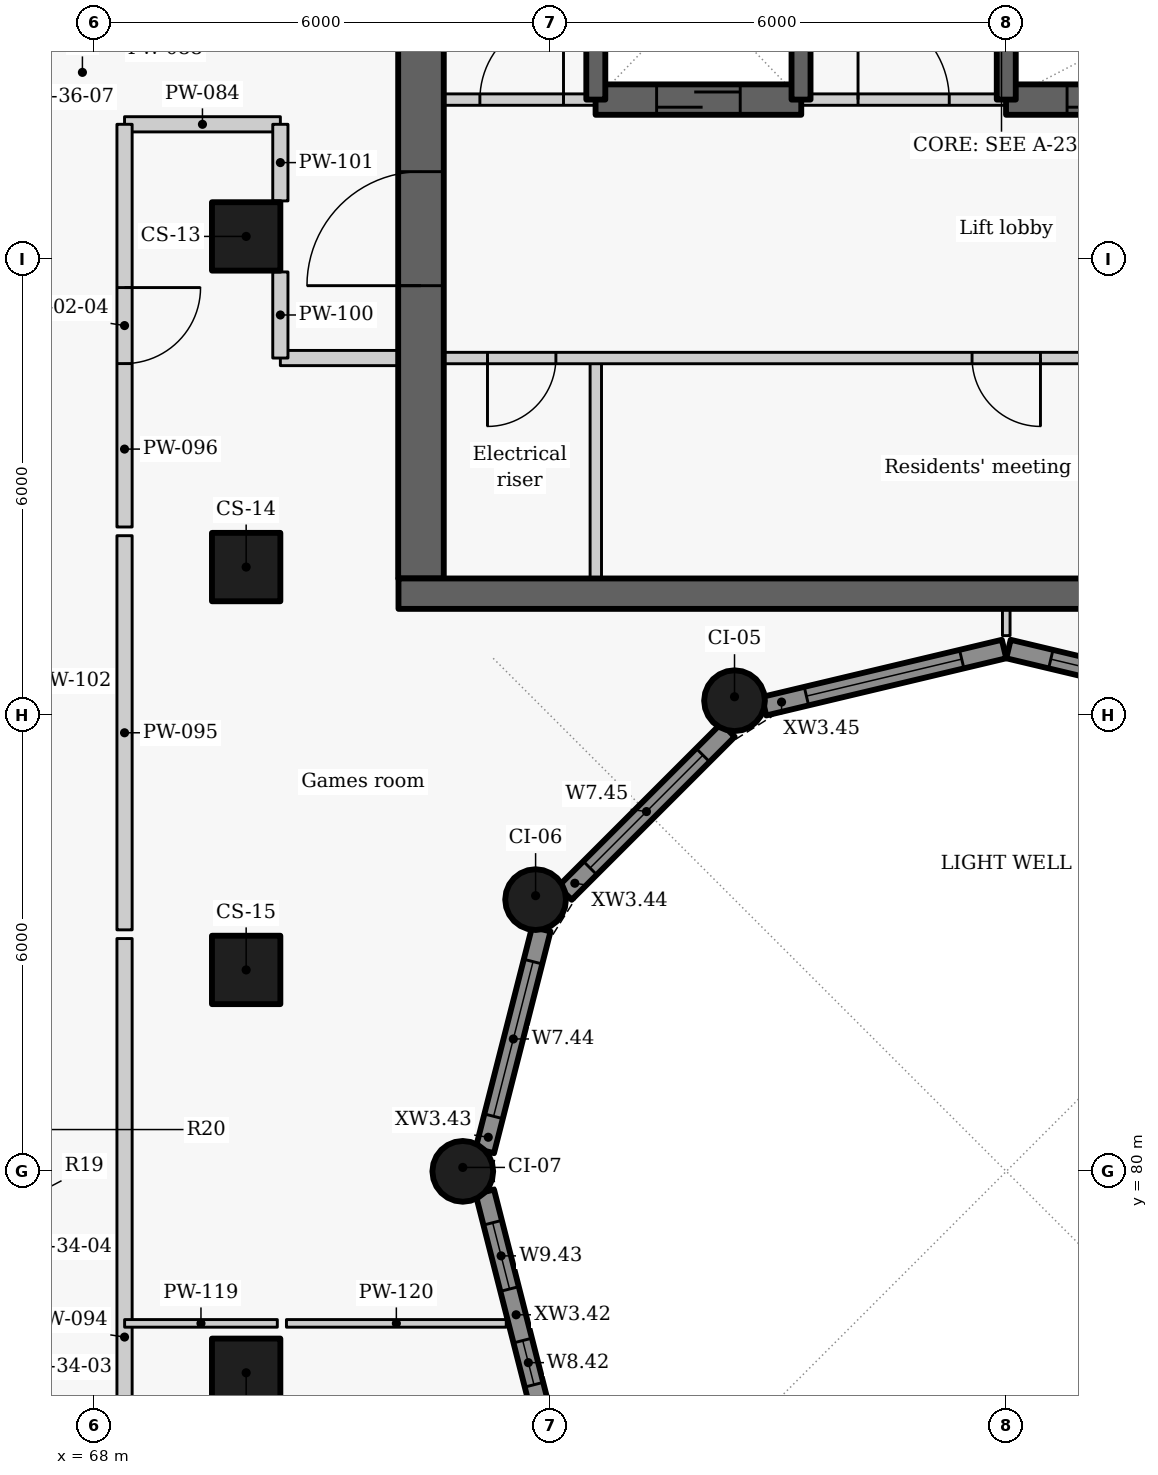
"""IFC4 building model, lengths in metres.
Left out: names, types, materials, properties, quantities, classifications, styles, units other than length and angle.
Written with IfcOpenShell. Run it as: python <this file> out.ifc"""

import sys

from ifc_helpers import new_model, si_unit, direction, frame, frame_2d, origin, origin_2d, place, context, subcontext, project, spatial, rectangle, circle, extrude, element, fill, save


model = new_model("IFC4")
c1 = context("Model", 3, precision=1e-05, world=origin(), true_north=direction((0.0, 1.0)))
c2 = subcontext(c1, "Body", "Model", "MODEL_VIEW")
j1 = project(units=[si_unit("LENGTHUNIT", "METRE"), si_unit("PLANEANGLEUNIT", "RADIAN")], contexts=[c1])
p1 = place(None, origin())
s1 = spatial("IfcSite", under=j1, at=p1, CompositionType="ELEMENT")
p2 = place(p1, origin())
s2 = spatial("IfcBuilding", under=s1, at=p2, CompositionType="ELEMENT")
p3 = place(p2, frame((0.0, 0.0, 216.3)))
s3 = spatial("IfcBuildingStorey", under=s2, at=p3, CompositionType="ELEMENT", Elevation=216.3)
for number, where, z_axis, x_axis in (
    (1, (70.0, 92.3, 0.0), (0.0, 0.0, 1.0), (0.0, -1.0, 0.0)),
    (2, (70.0, 87.95, 0.0), (0.0, 0.0, 1.0), (0.0, -1.0, 0.0)),
    (3, (70.0, 82.65, 0.0), (0.0, 0.0, 1.0), (0.0, -1.0, 0.0)),
    (4, (70.0, 77.35, 0.0), (0.0, 0.0, 1.0), (0.0, -1.0, 0.0)),
):
    element("IfcColumn", number, at=place(p3, frame(where, z_axis=z_axis, x_axis=x_axis)), inside=s3, PredefinedType="COLUMN", context=c2, shape_type="SweptSolid", body=[
        extrude(rectangle(XDim=0.9, YDim=0.9, at=origin_2d()), origin(), (0.0, 0.0, 1.0), 3.3),
    ])
for number, where, z_axis, x_axis in (
    (5, (76.425, 86.192, 0.0), (0.0, 0.0, 1.0), (-0.866, -0.5, 0.0)),
    (6, (73.808, 83.575, 0.0), (0.0, 0.0, 1.0), (-0.5, -0.866, 0.0)),
    (7, (72.85, 80.0, 0.0), (0.0, 0.0, 1.0), (0.0, -1.0, 0.0)),
):
    element("IfcColumn", number, at=place(p3, frame(where, z_axis=z_axis, x_axis=x_axis)), inside=s3, PredefinedType="COLUMN", context=c2, shape_type="SweptSolid", body=[
        extrude(circle(Radius=0.4, at=origin_2d()), origin(), (0.0, 0.0, 1.0), 3.3),
    ])
p4 = place(p3, frame((73.883, 76.813, 0.0), z_axis=(0.0, 0.0, 1.0), x_axis=(-0.247055971283, 0.969001211069, 0.0)))
e8 = element("IfcWall", 8, at=p4, inside=s3, PredefinedType="SOLIDWALL", context=c2, shape_type="SweptSolid", body=[
    extrude(rectangle(XDim=3.01, YDim=0.25, at=frame_2d((1.505, 0.0))), origin(), (0.0, 0.0, 1.0), 2.05),
])
p5 = place(p4, frame((0.392, 0.0, 0.9)))
e9 = element("IfcOpeningElement", 9, at=p5, cuts=e8, PredefinedType="OPENING", context=c2, shape_type="SweptSolid", body=[
    extrude(rectangle(XDim=0.6, YDim=1.1, at=frame_2d((0.3, 0.55))), frame((0.0, 0.135, 0.0), z_axis=(0.0, -1.0, 0.0), x_axis=(1.0, 0.0, 0.0)), (0.0, 0.0, 1.0), 0.27),
])
p6 = place(p4, frame((1.691, 0.0, 0.9)))
e10 = element("IfcOpeningElement", 10, at=p6, cuts=e8, PredefinedType="OPENING", context=c2, shape_type="SweptSolid", body=[
    extrude(rectangle(XDim=0.9, YDim=1.1, at=frame_2d((0.45, 0.55))), frame((0.0, 0.135, 0.0), z_axis=(0.0, -1.0, 0.0), x_axis=(1.0, 0.0, 0.0)), (0.0, 0.0, 1.0), 0.27),
])
p7 = place(p3, frame((73.14, 80.27, 0.0), z_axis=(0.0, 0.0, 1.0), x_axis=(0.247055971283, 0.969001211069, 0.0)))
e11 = element("IfcWall", 11, at=p7, inside=s3, PredefinedType="SOLIDWALL", context=c2, shape_type="SweptSolid", body=[
    extrude(rectangle(XDim=3.01, YDim=0.25, at=frame_2d((1.505, 0.0))), origin(), (0.0, 0.0, 1.0), 2.05),
])
p8 = place(p7, frame((0.469, 0.0, 0.9)))
e12 = element("IfcOpeningElement", 12, at=p8, cuts=e11, PredefinedType="OPENING", context=c2, shape_type="SweptSolid", body=[
    extrude(rectangle(XDim=2.1, YDim=1.1, at=frame_2d((1.05, 0.55))), frame((0.0, 0.135, 0.0), z_axis=(0.0, -1.0, 0.0), x_axis=(1.0, 0.0, 0.0)), (0.0, 0.0, 1.0), 0.27),
])
p9 = place(p3, frame((74.194, 83.661, 0.0), z_axis=(0.0, 0.0, 1.0), x_axis=(0.707106781187, 0.707106781187, 0.0)))
e13 = element("IfcWall", 13, at=p9, inside=s3, PredefinedType="SOLIDWALL", context=c2, shape_type="SweptSolid", body=[
    extrude(rectangle(XDim=3.033, YDim=0.25, at=frame_2d((1.517, 0.0))), origin(), (0.0, 0.0, 1.0), 2.05),
])
p10 = place(p9, frame((0.467, 0.0, 0.9)))
e14 = element("IfcOpeningElement", 14, at=p10, cuts=e13, PredefinedType="OPENING", context=c2, shape_type="SweptSolid", body=[
    extrude(rectangle(XDim=2.1, YDim=1.1, at=frame_2d((1.05, 0.55))), frame((0.0, 0.135, 0.0), z_axis=(0.0, -1.0, 0.0), x_axis=(1.0, 0.0, 0.0)), (0.0, 0.0, 1.0), 0.27),
])
p11 = place(p3, frame((76.814, 86.119, 0.0), z_axis=(0.0, 0.0, 1.0), x_axis=(0.972773113459, 0.231759508395, 0.0)))
e15 = element("IfcWall", 15, at=p11, inside=s3, PredefinedType="SOLIDWALL", context=c2, shape_type="SweptSolid", body=[
    extrude(rectangle(XDim=3.246, YDim=0.25, at=frame_2d((1.623, 0.0))), origin(), (0.0, 0.0, 1.0), 2.05),
])
p12 = place(p11, frame((0.573, 0.0, 0.9)))
e16 = element("IfcOpeningElement", 16, at=p12, cuts=e15, PredefinedType="OPENING", context=c2, shape_type="SweptSolid", body=[
    extrude(rectangle(XDim=2.1, YDim=1.1, at=frame_2d((1.05, 0.55))), frame((0.0, 0.135, 0.0), z_axis=(0.0, -1.0, 0.0), x_axis=(1.0, 0.0, 0.0)), (0.0, 0.0, 1.0), 0.27),
])
p13 = place(p3, frame((80.029, 86.872, 0.0), z_axis=(0.0, 0.0, 1.0), x_axis=(0.972773113459, -0.231759508395, 0.0)))
e17 = element("IfcWall", 17, at=p13, inside=s3, PredefinedType="SOLIDWALL", context=c2, shape_type="SweptSolid", body=[
    extrude(rectangle(XDim=3.246, YDim=0.25, at=frame_2d((1.623, 0.0))), origin(), (0.0, 0.0, 1.0), 2.05),
])
p14 = place(p13, frame((0.573, 0.0, 0.9)))
e18 = element("IfcOpeningElement", 18, at=p14, cuts=e17, PredefinedType="OPENING", context=c2, shape_type="SweptSolid", body=[
    extrude(rectangle(XDim=2.1, YDim=1.1, at=frame_2d((1.05, 0.55))), frame((0.0, 0.135, 0.0), z_axis=(0.0, -1.0, 0.0), x_axis=(1.0, 0.0, 0.0)), (0.0, 0.0, 1.0), 0.27),
])
p15 = place(p3, frame((74.6, 87.8, 0.0), z_axis=(0.0, 0.0, 1.0), x_axis=(0.0, 1.0, 0.0)))
e19 = element("IfcWall", 19, at=p15, inside=s3, PredefinedType="PARTITIONING", context=c2, shape_type="SweptSolid", body=[
    extrude(rectangle(XDim=2.9, YDim=0.15, at=frame_2d((1.45, 0.0))), origin(), (0.0, 0.0, 1.0), 2.95),
])
p16 = place(p3, frame((85.4, 90.7, 0.0), z_axis=(0.0, 0.0, 1.0), x_axis=(-1.0, 0.0, 0.0)))
e20 = element("IfcWall", 20, at=p16, inside=s3, PredefinedType="PARTITIONING", context=c2, shape_type="SweptSolid", body=[
    extrude(rectangle(XDim=13.4, YDim=0.15, at=frame_2d((6.7, 0.0))), origin(), (0.0, 0.0, 1.0), 2.95),
])
p17 = place(p16, frame((11.325, 0.0, 0.0)))
e21 = element("IfcOpeningElement", 21, at=p17, cuts=e20, PredefinedType="OPENING", context=c2, shape_type="SweptSolid", body=[
    extrude(rectangle(XDim=0.9, YDim=2.1, at=frame_2d((0.45, 1.05))), frame((0.0, 0.085, 0.0), z_axis=(0.0, -1.0, 0.0), x_axis=(1.0, 0.0, 0.0)), (0.0, 0.0, 1.0), 0.17),
])
p18 = place(p16, frame((4.95, 0.0, 0.0)))
e22 = element("IfcOpeningElement", 22, at=p18, cuts=e20, PredefinedType="OPENING", context=c2, shape_type="SweptSolid", body=[
    extrude(rectangle(XDim=0.9, YDim=2.1, at=frame_2d((0.45, 1.05))), frame((0.0, 0.085, 0.0), z_axis=(0.0, -1.0, 0.0), x_axis=(1.0, 0.0, 0.0)), (0.0, 0.0, 1.0), 0.17),
])
p19 = place(p3, frame((72.3, 87.8, -0.275), z_axis=(0.0, 0.0, 1.0), x_axis=(0.0, 1.0, 0.0)))
e23 = element("IfcWall", 23, at=p19, inside=s3, PredefinedType="SHEAR", context=c2, shape_type="SweptSolid", body=[
    extrude(rectangle(XDim=9.1, YDim=0.6, at=frame_2d((4.55, 0.0))), origin(), (0.0, 0.0, 1.0), 3.225),
])
p20 = place(p19, frame((3.852, 0.0, 0.275)))
e24 = element("IfcOpeningElement", 24, at=p20, cuts=e23, PredefinedType="OPENING", context=c2, shape_type="SweptSolid", body=[
    extrude(rectangle(XDim=1.5, YDim=2.1, at=frame_2d((0.75, 1.05))), frame((0.0, 0.31, 0.0), z_axis=(0.0, -1.0, 0.0), x_axis=(1.0, 0.0, 0.0)), (0.0, 0.0, 1.0), 0.62),
])
p21 = place(p3, frame((72.0, 94.1, 0.0), z_axis=(0.0, 0.0, 1.0), x_axis=(1.0, 0.0, 0.0)))
e25 = element("IfcWall", 25, at=p21, inside=s3, PredefinedType="PARTITIONING", context=c2, shape_type="SweptSolid", body=[
    extrude(rectangle(XDim=2.603, YDim=0.15, at=frame_2d((1.302, 0.0))), origin(), (0.0, 0.0, 1.0), 2.95),
])
p22 = place(p21, frame((1.075, 0.0, 0.0)))
e26 = element("IfcOpeningElement", 26, at=p22, cuts=e25, PredefinedType="OPENING", context=c2, shape_type="SweptSolid", body=[
    extrude(rectangle(XDim=1.1, YDim=2.1, at=frame_2d((0.55, 1.05))), frame((0.0, 0.085, 0.0), z_axis=(0.0, -1.0, 0.0), x_axis=(1.0, 0.0, 0.0)), (0.0, 0.0, 1.0), 0.17),
])
p23 = place(p3, frame((77.297, 94.1, 0.0), z_axis=(0.0, 0.0, 1.0), x_axis=(1.0, 0.0, 0.0)))
e27 = element("IfcWall", 27, at=p23, inside=s3, PredefinedType="PARTITIONING", context=c2, shape_type="SweptSolid", body=[
    extrude(rectangle(XDim=2.706, YDim=0.15, at=frame_2d((1.353, 0.0))), origin(), (0.0, 0.0, 1.0), 2.95),
])
p24 = place(p23, frame((0.753, 0.0, 0.0)))
e28 = element("IfcOpeningElement", 28, at=p24, cuts=e27, PredefinedType="OPENING", context=c2, shape_type="SweptSolid", body=[
    extrude(rectangle(XDim=1.2, YDim=2.1, at=frame_2d((0.6, 1.05))), frame((0.0, 0.085, 0.0), z_axis=(0.0, -1.0, 0.0), x_axis=(1.0, 0.0, 0.0)), (0.0, 0.0, 1.0), 0.17),
])
p25 = place(p3, frame((74.597, 94.1, -0.275), z_axis=(0.0, 0.0, 1.0), x_axis=(1.0, 0.0, 0.0)))
e29 = element("IfcWall", 29, at=p25, inside=s3, PredefinedType="SHEAR", context=c2, shape_type="SweptSolid", body=[
    extrude(rectangle(XDim=2.706, YDim=0.4, at=frame_2d((1.353, 0.0))), origin(), (0.0, 0.0, 1.0), 3.225),
])
p26 = place(p25, frame((0.803, 0.0, 0.275)))
e30 = element("IfcOpeningElement", 30, at=p26, cuts=e29, PredefinedType="OPENING", context=c2, shape_type="SweptSolid", body=[
    extrude(rectangle(XDim=1.1, YDim=2.1, at=frame_2d((0.55, 1.05))), frame((0.0, 0.21, 0.0), z_axis=(0.0, -1.0, 0.0), x_axis=(1.0, 0.0, 0.0)), (0.0, 0.0, 1.0), 0.42),
])
p27 = place(p3, frame((79.997, 94.1, -0.275), z_axis=(0.0, 0.0, 1.0), x_axis=(1.0, 0.0, 0.0)))
e31 = element("IfcWall", 31, at=p27, inside=s3, PredefinedType="SHEAR", context=c2, shape_type="SweptSolid", body=[
    extrude(rectangle(XDim=5.406, YDim=0.4, at=frame_2d((2.703, 0.0))), origin(), (0.0, 0.0, 1.0), 3.225),
])
p28 = place(p27, frame((0.803, 0.0, 0.275)))
e32 = element("IfcOpeningElement", 32, at=p28, cuts=e31, PredefinedType="OPENING", context=c2, shape_type="SweptSolid", body=[
    extrude(rectangle(XDim=1.1, YDim=2.1, at=frame_2d((0.55, 1.05))), frame((0.0, 0.21, 0.0), z_axis=(0.0, -1.0, 0.0), x_axis=(1.0, 0.0, 0.0)), (0.0, 0.0, 1.0), 0.42),
])
for number, where, z_axis, x_axis in (
    (33, (74.6, 94.1, -0.275), (0.0, 0.0, 1.0), (0.0, 1.0, 0.0)),
    (34, (77.3, 94.1, -0.275), (0.0, 0.0, 1.0), (0.0, 1.0, 0.0)),
    (35, (80.0, 94.1, -0.275), (0.0, 0.0, 1.0), (0.0, 1.0, 0.0)),
):
    element("IfcWall", number, at=place(p3, frame(where, z_axis=z_axis, x_axis=x_axis)), inside=s3, PredefinedType="SHEAR", context=c2, shape_type="SweptSolid", body=[
        extrude(rectangle(XDim=2.8, YDim=0.25, at=frame_2d((1.4, 0.0))), origin(), (0.0, 0.0, 1.0), 3.225),
    ])
p29 = place(p3, frame((68.4, 93.775, 0.0), z_axis=(0.0, 0.0, 1.0), x_axis=(1.0, 0.0, 0.0)))
e36 = element("IfcWall", 36, at=p29, inside=s3, PredefinedType="PARTITIONING", context=c2, shape_type="SweptSolid", body=[
    extrude(rectangle(XDim=2.05, YDim=0.2, at=frame_2d((1.025, 0.0))), origin(), (0.0, 0.0, 1.0), 2.43),
])
p30 = place(p3, frame((70.45, 90.7, 0.0), z_axis=(0.0, 0.0, 1.0), x_axis=(1.0, 0.0, 0.0)))
e37 = element("IfcWall", 37, at=p30, inside=s3, PredefinedType="PARTITIONING", context=c2, shape_type="SweptSolid", body=[
    extrude(rectangle(XDim=1.55, YDim=0.2, at=frame_2d((0.775, 0.0))), origin(), (0.0, 0.0, 1.0), 2.95),
])
p31 = place(p3, frame((68.4, 72.577, 0.0), z_axis=(0.0, 0.0, 1.0), x_axis=(0.0, 1.0, 0.0)))
e38 = element("IfcWall", 38, at=p31, inside=s3, PredefinedType="PARTITIONING", context=c2, shape_type="SweptSolid", body=[
    extrude(rectangle(XDim=10.486, YDim=0.2, at=frame_2d((5.243, 0.0))), origin(), (0.0, 0.0, 1.0), 2.95),
])
p32 = place(p3, frame((68.4, 83.177, 0.0), z_axis=(0.0, 0.0, 1.0), x_axis=(0.0, 1.0, 0.0)))
e39 = element("IfcWall", 39, at=p32, inside=s3, PredefinedType="PARTITIONING", context=c2, shape_type="SweptSolid", body=[
    extrude(rectangle(XDim=5.186, YDim=0.2, at=frame_2d((2.593, 0.0))), origin(), (0.0, 0.0, 1.0), 2.95),
])
p33 = place(p3, frame((68.4, 93.775, 0.0), z_axis=(0.0, 0.0, 1.0), x_axis=(0.0, -1.0, 0.0)))
e40 = element("IfcWall", 40, at=p33, inside=s3, PredefinedType="PARTITIONING", context=c2, shape_type="SweptSolid", body=[
    extrude(rectangle(XDim=5.298, YDim=0.2, at=frame_2d((2.649, 0.0))), origin(), (0.0, 0.0, 1.0), 2.95),
])
p34 = place(p33, frame((2.148, 0.0, 0.0)))
e41 = element("IfcOpeningElement", 41, at=p34, cuts=e40, PredefinedType="OPENING", context=c2, shape_type="SweptSolid", body=[
    extrude(rectangle(XDim=1.0, YDim=2.1, at=frame_2d((0.5, 1.05))), frame((0.0, 0.11, 0.0), z_axis=(0.0, -1.0, 0.0), x_axis=(1.0, 0.0, 0.0)), (0.0, 0.0, 1.0), 0.22),
])
p35 = place(p3, frame((70.45, 90.7, 0.0), z_axis=(0.0, 0.0, 1.0), x_axis=(0.0, 1.0, 0.0)))
e42 = element("IfcWall", 42, at=p35, inside=s3, PredefinedType="PARTITIONING", context=c2, shape_type="SweptSolid", body=[
    extrude(rectangle(XDim=1.133, YDim=0.2, at=frame_2d((0.566, 0.0))), origin(), (0.0, 0.0, 1.0), 2.43),
])
p36 = place(p3, frame((70.45, 92.767, 0.0), z_axis=(0.0, 0.0, 1.0), x_axis=(0.0, 1.0, 0.0)))
e43 = element("IfcWall", 43, at=p36, inside=s3, PredefinedType="PARTITIONING", context=c2, shape_type="SweptSolid", body=[
    extrude(rectangle(XDim=1.008, YDim=0.2, at=frame_2d((0.504, 0.0))), origin(), (0.0, 0.0, 1.0), 2.43),
])
p37 = place(p3, frame((80.0, 87.048, 0.0), z_axis=(0.0, 0.0, 1.0), x_axis=(0.0, 1.0, 0.0)))
e44 = element("IfcWall", 44, at=p37, inside=s3, PredefinedType="PARTITIONING", context=c2, shape_type="SweptSolid", body=[
    extrude(rectangle(XDim=0.352, YDim=0.1, at=frame_2d((0.176, 0.0))), origin(), (0.0, 0.0, 1.0), 2.95),
])
p38 = place(p3, frame((68.401, 78.0, 0.0), z_axis=(0.0, 0.0, 1.0), x_axis=(1.0, 0.0, 0.0)))
e45 = element("IfcWall", 45, at=p38, inside=s3, PredefinedType="PARTITIONING", context=c2, shape_type="SweptSolid", body=[
    extrude(rectangle(XDim=2.009, YDim=0.1, at=frame_2d((1.004, 0.0))), origin(), (0.0, 0.0, 1.0), 2.43),
])
p39 = place(p3, frame((70.53, 78.0, 0.0), z_axis=(0.0, 0.0, 1.0), x_axis=(1.0, 0.0, 0.0)))
e46 = element("IfcWall", 46, at=p39, inside=s3, PredefinedType="PARTITIONING", context=c2, shape_type="SweptSolid", body=[
    extrude(rectangle(XDim=2.892, YDim=0.1, at=frame_2d((1.446, 0.0))), origin(), (0.0, 0.0, 1.0), 2.95),
])
p40 = place(p3, frame((72.004, 87.6, -0.275), z_axis=(0.0, 0.0, 1.0), x_axis=(1.0, 0.0, 0.0)))
e47 = element("IfcWall", 47, at=p40, inside=s3, PredefinedType="SHEAR", context=c2, shape_type="SweptSolid", body=[
    extrude(rectangle(XDim=15.992, YDim=0.4, at=frame_2d((7.996, 0.0))), origin(), (0.0, 0.0, 1.0), 3.225),
])
p41 = place(p5, origin())
e48 = element("IfcWindow", 48, at=p41, inside=s3, PartitioningType="SINGLE_PANEL", PredefinedType="WINDOW", context=c2, shape_type="SweptSolid", body=[
    extrude(rectangle(XDim=0.6, YDim=1.1, at=frame_2d((0.3, 0.55))), frame((0.0, 0.03, 0.0), z_axis=(0.0, -1.0, 0.0), x_axis=(1.0, 0.0, 0.0)), (0.0, 0.0, 1.0), 0.06),
])
fill(e9, e48)
p42 = place(p6, origin())
e49 = element("IfcWindow", 49, at=p42, inside=s3, PartitioningType="SINGLE_PANEL", PredefinedType="WINDOW", context=c2, shape_type="SweptSolid", body=[
    extrude(rectangle(XDim=0.9, YDim=1.1, at=frame_2d((0.45, 0.55))), frame((0.0, 0.03, 0.0), z_axis=(0.0, -1.0, 0.0), x_axis=(1.0, 0.0, 0.0)), (0.0, 0.0, 1.0), 0.06),
])
fill(e10, e49)
p43 = place(p8, origin())
e50 = element("IfcWindow", 50, at=p43, inside=s3, PartitioningType="SINGLE_PANEL", PredefinedType="WINDOW", context=c2, shape_type="SweptSolid", body=[
    extrude(rectangle(XDim=2.1, YDim=1.1, at=frame_2d((1.05, 0.55))), frame((0.0, 0.03, 0.0), z_axis=(0.0, -1.0, 0.0), x_axis=(1.0, 0.0, 0.0)), (0.0, 0.0, 1.0), 0.06),
])
fill(e12, e50)
p44 = place(p10, origin())
e51 = element("IfcWindow", 51, at=p44, inside=s3, PartitioningType="SINGLE_PANEL", PredefinedType="WINDOW", context=c2, shape_type="SweptSolid", body=[
    extrude(rectangle(XDim=2.1, YDim=1.1, at=frame_2d((1.05, 0.55))), frame((0.0, 0.03, 0.0), z_axis=(0.0, -1.0, 0.0), x_axis=(1.0, 0.0, 0.0)), (0.0, 0.0, 1.0), 0.06),
])
fill(e14, e51)
p45 = place(p12, origin())
e52 = element("IfcWindow", 52, at=p45, inside=s3, PartitioningType="SINGLE_PANEL", PredefinedType="WINDOW", context=c2, shape_type="SweptSolid", body=[
    extrude(rectangle(XDim=2.1, YDim=1.1, at=frame_2d((1.05, 0.55))), frame((0.0, 0.03, 0.0), z_axis=(0.0, -1.0, 0.0), x_axis=(1.0, 0.0, 0.0)), (0.0, 0.0, 1.0), 0.06),
])
fill(e16, e52)
p46 = place(p14, origin())
e53 = element("IfcWindow", 53, at=p46, inside=s3, PartitioningType="SINGLE_PANEL", PredefinedType="WINDOW", context=c2, shape_type="SweptSolid", body=[
    extrude(rectangle(XDim=2.1, YDim=1.1, at=frame_2d((1.05, 0.55))), frame((0.0, 0.03, 0.0), z_axis=(0.0, -1.0, 0.0), x_axis=(1.0, 0.0, 0.0)), (0.0, 0.0, 1.0), 0.06),
])
fill(e18, e53)
p47 = place(p17, origin())
e54 = element("IfcDoor", 54, at=p47, inside=s3, OperationType="SINGLE_SWING_RIGHT", PredefinedType="DOOR", context=c2, shape_type="SweptSolid", body=[
    extrude(rectangle(XDim=0.9, YDim=2.1, at=frame_2d((0.45, 1.05))), frame((0.0, 0.025, 0.0), z_axis=(0.0, -1.0, 0.0), x_axis=(1.0, 0.0, 0.0)), (0.0, 0.0, 1.0), 0.05),
])
fill(e21, e54)
p48 = place(p18, origin())
e55 = element("IfcDoor", 55, at=p48, inside=s3, OperationType="SINGLE_SWING_LEFT", PredefinedType="DOOR", context=c2, shape_type="SweptSolid", body=[
    extrude(rectangle(XDim=0.9, YDim=2.1, at=frame_2d((0.45, 1.05))), frame((0.0, 0.025, 0.0), z_axis=(0.0, -1.0, 0.0), x_axis=(1.0, 0.0, 0.0)), (0.0, 0.0, 1.0), 0.05),
])
fill(e22, e55)
p49 = place(p22, origin())
e56 = element("IfcDoor", 56, at=p49, inside=s3, OperationType="SINGLE_SWING_RIGHT", PredefinedType="DOOR", context=c2, shape_type="SweptSolid", body=[
    extrude(rectangle(XDim=1.1, YDim=2.1, at=frame_2d((0.55, 1.05))), frame((0.0, 0.025, 0.0), z_axis=(0.0, -1.0, 0.0), x_axis=(1.0, 0.0, 0.0)), (0.0, 0.0, 1.0), 0.05),
])
fill(e26, e56)
p50 = place(p26, origin())
e57 = element("IfcDoor", 57, at=p50, inside=s3, OperationType="SLIDING_TO_LEFT", PredefinedType="DOOR", context=c2, shape_type="SweptSolid", body=[
    extrude(rectangle(XDim=1.1, YDim=2.1, at=frame_2d((0.55, 1.05))), frame((0.0, 0.025, 0.0), z_axis=(0.0, -1.0, 0.0), x_axis=(1.0, 0.0, 0.0)), (0.0, 0.0, 1.0), 0.05),
])
fill(e30, e57)
p51 = place(p24, origin())
e58 = element("IfcDoor", 58, at=p51, inside=s3, OperationType="DOUBLE_DOOR_SINGLE_SWING", PredefinedType="DOOR", context=c2, shape_type="SweptSolid", body=[
    extrude(rectangle(XDim=1.2, YDim=2.1, at=frame_2d((0.6, 1.05))), frame((0.0, 0.025, 0.0), z_axis=(0.0, -1.0, 0.0), x_axis=(1.0, 0.0, 0.0)), (0.0, 0.0, 1.0), 0.05),
])
fill(e28, e58)
p52 = place(p28, origin())
e59 = element("IfcDoor", 59, at=p52, inside=s3, OperationType="SLIDING_TO_LEFT", PredefinedType="DOOR", context=c2, shape_type="SweptSolid", body=[
    extrude(rectangle(XDim=1.1, YDim=2.1, at=frame_2d((0.55, 1.05))), frame((0.0, 0.025, 0.0), z_axis=(0.0, -1.0, 0.0), x_axis=(1.0, 0.0, 0.0)), (0.0, 0.0, 1.0), 0.05),
])
fill(e32, e59)
p53 = place(p34, origin())
e60 = element("IfcDoor", 60, at=p53, inside=s3, OperationType="SINGLE_SWING_LEFT", PredefinedType="DOOR", context=c2, shape_type="SweptSolid", body=[
    extrude(rectangle(XDim=1.0, YDim=2.1, at=frame_2d((0.5, 1.05))), frame((0.0, 0.025, 0.0), z_axis=(0.0, -1.0, 0.0), x_axis=(1.0, 0.0, 0.0)), (0.0, 0.0, 1.0), 0.05),
])
fill(e41, e60)
p54 = place(p20, origin())
e61 = element("IfcDoor", 61, at=p54, inside=s3, OperationType="DOUBLE_DOOR_SINGLE_SWING", PredefinedType="DOOR", context=c2, shape_type="SweptSolid", body=[
    extrude(rectangle(XDim=1.5, YDim=2.1, at=frame_2d((0.75, 1.05))), frame((0.0, 0.025, 0.0), z_axis=(0.0, -1.0, 0.0), x_axis=(1.0, 0.0, 0.0)), (0.0, 0.0, 1.0), 0.05),
])
fill(e24, e61)
save(model, sys.argv[1])
